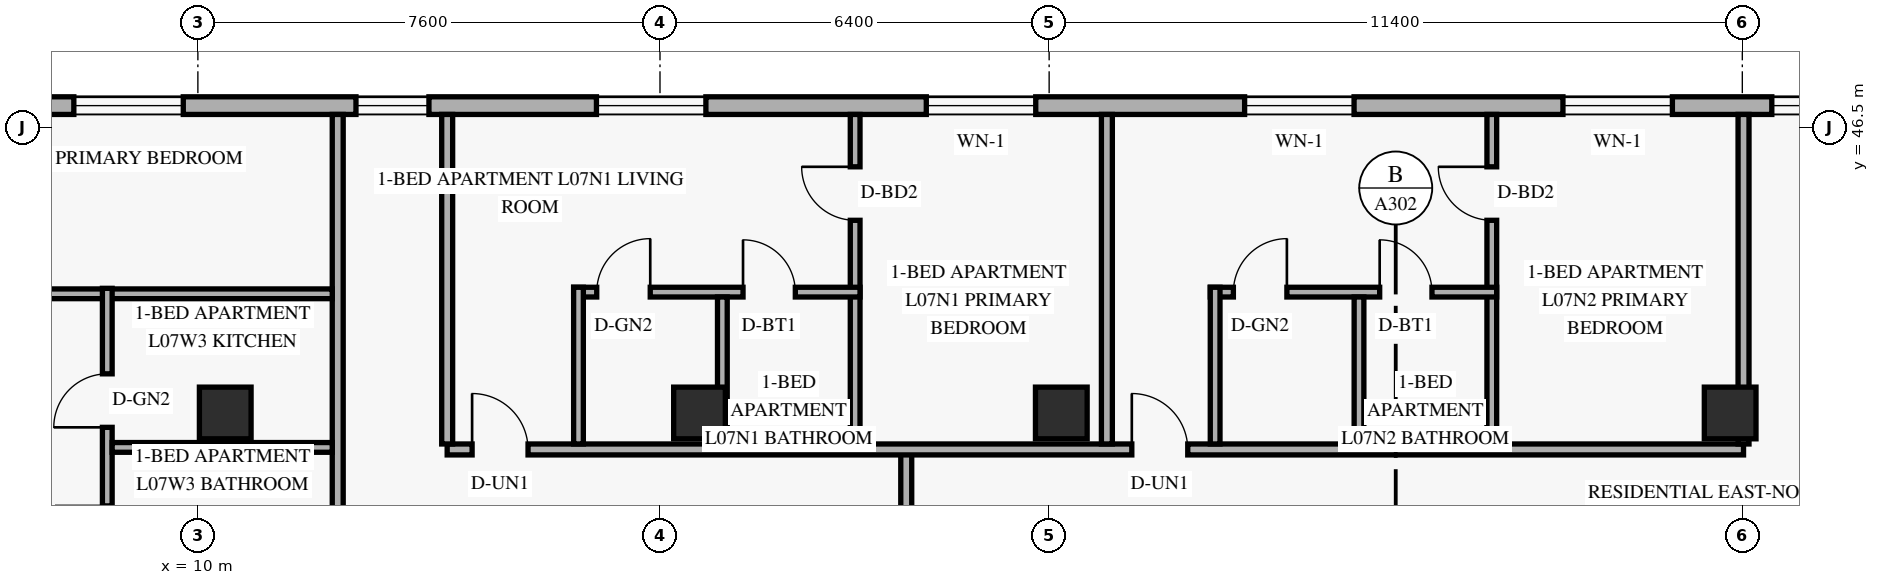
"""IFC4 building model, lengths in metres.
Left out: names, types, materials, properties, quantities, classifications, styles, units other than length and angle.
Written with IfcOpenShell. Run it as: python <this file> out.ifc"""

import sys

from ifc_helpers import new_model, si_unit, direction, frame, frame_2d, origin, origin_2d, place, context, subcontext, project, spatial, rectangle, extrude, element, fill, save


model = new_model("IFC4")
c1 = context("Model", 3, precision=1e-05, world=origin(), true_north=direction((0.0, 1.0)))
c2 = subcontext(c1, "Body", "Model", "MODEL_VIEW")
j1 = project(units=[si_unit("LENGTHUNIT", "METRE"), si_unit("PLANEANGLEUNIT", "RADIAN")], contexts=[c1])
p1 = place(None, origin())
s1 = spatial("IfcSite", under=j1, at=p1, CompositionType="ELEMENT")
p2 = place(p1, origin())
s2 = spatial("IfcBuilding", under=s1, at=p2, CompositionType="ELEMENT")
p3 = place(p2, frame((0.0, 0.0, 31.2)))
s3 = spatial("IfcBuildingStorey", under=s2, at=p3, CompositionType="ELEMENT", Elevation=31.2)
for number, where, z_axis, x_axis in (
    (1, (10.45, 41.8, 0.0), (0.0, 0.0, 1.0), (1.0, 0.0, 0.0)),
    (2, (18.25, 41.8, 0.0), (0.0, 0.0, 1.0), (1.0, 0.0, 0.0)),
    (3, (24.2, 41.8, 0.0), (0.0, 0.0, 1.0), (1.0, 0.0, 0.0)),
    (4, (35.2, 41.8, 0.0), (0.0, 0.0, 1.0), (1.0, 0.0, 0.0)),
):
    element("IfcColumn", number, at=place(p3, frame(where, z_axis=z_axis, x_axis=x_axis)), inside=s3, PredefinedType="COLUMN", context=c2, shape_type="SweptSolid", body=[
        extrude(rectangle(XDim=0.85, YDim=0.85, at=origin_2d()), origin(), (0.0, 0.0, 1.0), 3.6),
    ])
p4 = place(p3, frame((44.98, 46.855, 0.0), z_axis=(0.0, 0.0, 1.0), x_axis=(-1.0, 0.0, 0.0)))
e5 = element("IfcWall", 5, at=p4, inside=s3, PredefinedType="SOLIDWALL", context=c2, shape_type="SweptSolid", body=[
    extrude(rectangle(XDim=39.56, YDim=0.29, at=frame_2d((19.78, 0.0))), origin(), (0.0, 0.0, 1.0), 3.36),
])
p5 = place(p4, frame((35.22, 0.0, 0.85)))
e6 = element("IfcOpeningElement", 6, at=p5, cuts=e5, PredefinedType="OPENING", context=c2, shape_type="SweptSolid", body=[
    extrude(rectangle(XDim=1.8, YDim=1.6, at=frame_2d((0.9, 0.8))), frame((0.0, 0.155, 0.0), z_axis=(0.0, -1.0, 0.0), x_axis=(1.0, 0.0, 0.0)), (0.0, 0.0, 1.0), 0.31),
])
p6 = place(p4, frame((31.18, 0.0, 0.85)))
e7 = element("IfcOpeningElement", 7, at=p6, cuts=e5, PredefinedType="OPENING", context=c2, shape_type="SweptSolid", body=[
    extrude(rectangle(XDim=1.2, YDim=1.5, at=frame_2d((0.6, 0.75))), frame((0.0, 0.155, 0.0), z_axis=(0.0, -1.0, 0.0), x_axis=(1.0, 0.0, 0.0)), (0.0, 0.0, 1.0), 0.31),
])
p7 = place(p4, frame((26.625, 0.0, 0.85)))
e8 = element("IfcOpeningElement", 8, at=p7, cuts=e5, PredefinedType="OPENING", context=c2, shape_type="SweptSolid", body=[
    extrude(rectangle(XDim=1.8, YDim=1.6, at=frame_2d((0.9, 0.8))), frame((0.0, 0.155, 0.0), z_axis=(0.0, -1.0, 0.0), x_axis=(1.0, 0.0, 0.0)), (0.0, 0.0, 1.0), 0.31),
])
p8 = place(p4, frame((21.2, 0.0, 0.85)))
e9 = element("IfcOpeningElement", 9, at=p8, cuts=e5, PredefinedType="OPENING", context=c2, shape_type="SweptSolid", body=[
    extrude(rectangle(XDim=1.8, YDim=1.6, at=frame_2d((0.9, 0.8))), frame((0.0, 0.155, 0.0), z_axis=(0.0, -1.0, 0.0), x_axis=(1.0, 0.0, 0.0)), (0.0, 0.0, 1.0), 0.31),
])
p9 = place(p4, frame((15.965, 0.0, 0.85)))
e10 = element("IfcOpeningElement", 10, at=p9, cuts=e5, PredefinedType="OPENING", context=c2, shape_type="SweptSolid", body=[
    extrude(rectangle(XDim=1.8, YDim=1.6, at=frame_2d((0.9, 0.8))), frame((0.0, 0.155, 0.0), z_axis=(0.0, -1.0, 0.0), x_axis=(1.0, 0.0, 0.0)), (0.0, 0.0, 1.0), 0.31),
])
p10 = place(p4, frame((10.73, 0.0, 0.85)))
e11 = element("IfcOpeningElement", 11, at=p10, cuts=e5, PredefinedType="OPENING", context=c2, shape_type="SweptSolid", body=[
    extrude(rectangle(XDim=1.8, YDim=1.6, at=frame_2d((0.9, 0.8))), frame((0.0, 0.155, 0.0), z_axis=(0.0, -1.0, 0.0), x_axis=(1.0, 0.0, 0.0)), (0.0, 0.0, 1.0), 0.31),
])
p11 = place(p4, frame((7.895, 0.0, 0.85)))
e12 = element("IfcOpeningElement", 12, at=p11, cuts=e5, PredefinedType="OPENING", context=c2, shape_type="SweptSolid", body=[
    extrude(rectangle(XDim=1.2, YDim=1.5, at=frame_2d((0.6, 0.75))), frame((0.0, 0.155, 0.0), z_axis=(0.0, -1.0, 0.0), x_axis=(1.0, 0.0, 0.0)), (0.0, 0.0, 1.0), 0.31),
])
p12 = place(p4, frame((2.815, 0.0, 0.85)))
e13 = element("IfcOpeningElement", 13, at=p12, cuts=e5, PredefinedType="OPENING", context=c2, shape_type="SweptSolid", body=[
    extrude(rectangle(XDim=1.8, YDim=1.6, at=frame_2d((0.9, 0.8))), frame((0.0, 0.155, 0.0), z_axis=(0.0, -1.0, 0.0), x_axis=(1.0, 0.0, 0.0)), (0.0, 0.0, 1.0), 0.31),
])
p13 = place(p3, frame((21.65, 6.8, 0.0), z_axis=(0.0, 0.0, 1.0), x_axis=(0.0, 1.0, 0.0)))
e14 = element("IfcWall", 14, at=p13, inside=s3, PredefinedType="STANDARD", context=c2, shape_type="SweptSolid", body=[
    extrude(rectangle(XDim=34.4, YDim=0.18, at=frame_2d((17.2, 0.0))), origin(), (0.0, 0.0, 1.0), 2.649),
])
p14 = place(p3, frame((14.1, 41.2, 0.0), z_axis=(0.0, 0.0, 1.0), x_axis=(1.0, 0.0, 0.0)))
e15 = element("IfcWall", 15, at=p14, inside=s3, PredefinedType="STANDARD", context=c2, shape_type="SweptSolid", body=[
    extrude(rectangle(XDim=21.32, YDim=0.18, at=frame_2d((10.66, 0.0))), origin(), (0.0, 0.0, 1.0), 2.649),
])
p15 = place(p14, frame((0.41, 0.0, 0.0)))
e16 = element("IfcOpeningElement", 16, at=p15, cuts=e15, PredefinedType="OPENING", context=c2, shape_type="SweptSolid", body=[
    extrude(rectangle(XDim=0.92, YDim=2.15, at=frame_2d((0.46, 1.075))), frame((0.0, 0.1, 0.0), z_axis=(0.0, -1.0, 0.0), x_axis=(1.0, 0.0, 0.0)), (0.0, 0.0, 1.0), 0.2),
])
p16 = place(p14, frame((11.26, 0.0, 0.0)))
e17 = element("IfcOpeningElement", 17, at=p16, cuts=e15, PredefinedType="OPENING", context=c2, shape_type="SweptSolid", body=[
    extrude(rectangle(XDim=0.92, YDim=2.15, at=frame_2d((0.46, 1.075))), frame((0.0, 0.1, 0.0), z_axis=(0.0, -1.0, 0.0), x_axis=(1.0, 0.0, 0.0)), (0.0, 0.0, 1.0), 0.2),
])
p17 = place(p3, frame((35.42, 41.29, 0.0), z_axis=(0.0, 0.0, 1.0), x_axis=(0.0, 1.0, 0.0)))
e18 = element("IfcWall", 18, at=p17, inside=s3, PredefinedType="PARTITIONING", context=c2, shape_type="SweptSolid", body=[
    extrude(rectangle(XDim=5.42, YDim=0.18, at=frame_2d((2.71, 0.0))), origin(), (0.0, 0.0, 1.0), 3.36),
])
p18 = place(p3, frame((12.3, 1.29, 0.0), z_axis=(0.0, 0.0, 1.0), x_axis=(0.0, 1.0, 0.0)))
e19 = element("IfcWall", 19, at=p18, inside=s3, PredefinedType="STANDARD", context=c2, shape_type="SweptSolid", body=[
    extrude(rectangle(XDim=45.42, YDim=0.18, at=frame_2d((22.71, 0.0))), origin(), (0.0, 0.0, 1.0), 2.649),
])
p19 = place(p18, frame((9.41, 0.0, 0.0)))
e20 = element("IfcOpeningElement", 20, at=p19, cuts=e19, PredefinedType="OPENING", context=c2, shape_type="SweptSolid", body=[
    extrude(rectangle(XDim=0.92, YDim=2.15, at=frame_2d((0.46, 1.075))), frame((0.0, 0.1, 0.0), z_axis=(0.0, -1.0, 0.0), x_axis=(1.0, 0.0, 0.0)), (0.0, 0.0, 1.0), 0.2),
])
p20 = place(p18, frame((21.05, 0.0, 0.0)))
e21 = element("IfcOpeningElement", 21, at=p20, cuts=e19, PredefinedType="OPENING", context=c2, shape_type="SweptSolid", body=[
    extrude(rectangle(XDim=0.92, YDim=2.15, at=frame_2d((0.46, 1.075))), frame((0.0, 0.1, 0.0), z_axis=(0.0, -1.0, 0.0), x_axis=(1.0, 0.0, 0.0)), (0.0, 0.0, 1.0), 0.2),
])
p21 = place(p18, frame((36.491, 0.0, 0.0)))
e22 = element("IfcOpeningElement", 22, at=p21, cuts=e19, PredefinedType="OPENING", context=c2, shape_type="SweptSolid", body=[
    extrude(rectangle(XDim=0.92, YDim=2.15, at=frame_2d((0.46, 1.075))), frame((0.0, 0.1, 0.0), z_axis=(0.0, -1.0, 0.0), x_axis=(1.0, 0.0, 0.0)), (0.0, 0.0, 1.0), 0.2),
])
p22 = place(p3, frame((14.1, 41.29, 0.0), z_axis=(0.0, 0.0, 1.0), x_axis=(0.0, 1.0, 0.0)))
e23 = element("IfcWall", 23, at=p22, inside=s3, PredefinedType="PARTITIONING", context=c2, shape_type="SweptSolid", body=[
    extrude(rectangle(XDim=5.42, YDim=0.18, at=frame_2d((2.71, 0.0))), origin(), (0.0, 0.0, 1.0), 2.809),
])
p23 = place(p3, frame((2.162, 43.76, 0.0), z_axis=(0.0, 0.0, 1.0), x_axis=(1.0, 0.0, 0.0)))
e24 = element("IfcWall", 24, at=p23, inside=s3, PredefinedType="PARTITIONING", context=c2, shape_type="SweptSolid", body=[
    extrude(rectangle(XDim=10.048, YDim=0.16, at=frame_2d((5.024, 0.0))), origin(), (0.0, 0.0, 1.0), 3.36),
])
p24 = place(p23, frame((2.528, 0.0, 0.0)))
e25 = element("IfcOpeningElement", 25, at=p24, cuts=e24, PredefinedType="OPENING", context=c2, shape_type="SweptSolid", body=[
    extrude(rectangle(XDim=0.9, YDim=2.14, at=frame_2d((0.45, 1.07))), frame((0.0, 0.09, 0.0), z_axis=(0.0, -1.0, 0.0), x_axis=(1.0, 0.0, 0.0)), (0.0, 0.0, 1.0), 0.18),
])
p25 = place(p3, frame((8.51, 38.991, 0.0), z_axis=(0.0, 0.0, 1.0), x_axis=(0.0, 1.0, 0.0)))
e26 = element("IfcWall", 26, at=p25, inside=s3, PredefinedType="PLUMBINGWALL", context=c2, shape_type="SweptSolid", body=[
    extrude(rectangle(XDim=4.859, YDim=0.16, at=frame_2d((2.429, 0.0))), origin(), (0.0, 0.0, 1.0), 2.809),
])
p26 = place(p25, frame((0.42, 0.0, 0.0)))
e27 = element("IfcOpeningElement", 27, at=p26, cuts=e26, PredefinedType="OPENING", context=c2, shape_type="SweptSolid", body=[
    extrude(rectangle(XDim=0.86, YDim=2.12, at=frame_2d((0.43, 1.06))), frame((0.0, 0.09, 0.0), z_axis=(0.0, -1.0, 0.0), x_axis=(1.0, 0.0, 0.0)), (0.0, 0.0, 1.0), 0.18),
])
p27 = place(p25, frame((2.572, 0.0, 0.0)))
e28 = element("IfcOpeningElement", 28, at=p27, cuts=e26, PredefinedType="OPENING", context=c2, shape_type="SweptSolid", body=[
    extrude(rectangle(XDim=0.88, YDim=2.12, at=frame_2d((0.44, 1.06))), frame((0.0, 0.09, 0.0), z_axis=(0.0, -1.0, 0.0), x_axis=(1.0, 0.0, 0.0)), (0.0, 0.0, 1.0), 0.18),
])
p28 = place(p3, frame((8.59, 41.234, 0.0), z_axis=(0.0, 0.0, 1.0), x_axis=(1.0, 0.0, 0.0)))
e29 = element("IfcWall", 29, at=p28, inside=s3, PredefinedType="PLUMBINGWALL", context=c2, shape_type="SweptSolid", body=[
    extrude(rectangle(XDim=3.62, YDim=0.16, at=frame_2d((1.81, 0.0))), origin(), (0.0, 0.0, 1.0), 2.649),
])
p29 = place(p3, frame((24.95, 41.29, 0.0), z_axis=(0.0, 0.0, 1.0), x_axis=(0.0, 1.0, 0.0)))
e30 = element("IfcWall", 30, at=p29, inside=s3, PredefinedType="PARTITIONING", context=c2, shape_type="SweptSolid", body=[
    extrude(rectangle(XDim=5.42, YDim=0.18, at=frame_2d((2.71, 0.0))), origin(), (0.0, 0.0, 1.0), 2.809),
])
p30 = place(p3, frame((20.81, 41.29, 0.0), z_axis=(0.0, 0.0, 1.0), x_axis=(0.0, 1.0, 0.0)))
e31 = element("IfcWall", 31, at=p30, inside=s3, PredefinedType="PARTITIONING", context=c2, shape_type="SweptSolid", body=[
    extrude(rectangle(XDim=5.42, YDim=0.16, at=frame_2d((2.71, 0.0))), origin(), (0.0, 0.0, 1.0), 2.809),
])
p31 = place(p30, frame((3.679, 0.0, 0.0)))
e32 = element("IfcOpeningElement", 32, at=p31, cuts=e31, PredefinedType="OPENING", context=c2, shape_type="SweptSolid", body=[
    extrude(rectangle(XDim=0.88, YDim=2.14, at=frame_2d((0.44, 1.07))), frame((0.0, 0.09, 0.0), z_axis=(0.0, -1.0, 0.0), x_axis=(1.0, 0.0, 0.0)), (0.0, 0.0, 1.0), 0.18),
])
p32 = place(p3, frame((16.18, 43.788, 0.0), z_axis=(0.0, 0.0, 1.0), x_axis=(1.0, 0.0, 0.0)))
e33 = element("IfcWall", 33, at=p32, inside=s3, PredefinedType="PLUMBINGWALL", context=c2, shape_type="SweptSolid", body=[
    extrude(rectangle(XDim=4.71, YDim=0.16, at=frame_2d((2.355, 0.0))), origin(), (0.0, 0.0, 1.0), 3.36),
])
p33 = place(p32, frame((0.38, 0.0, 0.0)))
e34 = element("IfcOpeningElement", 34, at=p33, cuts=e33, PredefinedType="OPENING", context=c2, shape_type="SweptSolid", body=[
    extrude(rectangle(XDim=0.88, YDim=2.12, at=frame_2d((0.44, 1.06))), frame((0.0, 0.09, 0.0), z_axis=(0.0, -1.0, 0.0), x_axis=(1.0, 0.0, 0.0)), (0.0, 0.0, 1.0), 0.18),
])
p34 = place(p32, frame((2.786, 0.0, 0.0)))
e35 = element("IfcOpeningElement", 35, at=p34, cuts=e33, PredefinedType="OPENING", context=c2, shape_type="SweptSolid", body=[
    extrude(rectangle(XDim=0.86, YDim=2.12, at=frame_2d((0.43, 1.06))), frame((0.0, 0.09, 0.0), z_axis=(0.0, -1.0, 0.0), x_axis=(1.0, 0.0, 0.0)), (0.0, 0.0, 1.0), 0.18),
])
p35 = place(p3, frame((16.26, 41.29, 0.0), z_axis=(0.0, 0.0, 1.0), x_axis=(0.0, 1.0, 0.0)))
e36 = element("IfcWall", 36, at=p35, inside=s3, PredefinedType="PLUMBINGWALL", context=c2, shape_type="SweptSolid", body=[
    extrude(rectangle(XDim=2.577, YDim=0.16, at=frame_2d((1.289, 0.0))), origin(), (0.0, 0.0, 1.0), 2.809),
])
p36 = place(p3, frame((18.625, 41.29, 0.0), z_axis=(0.0, 0.0, 1.0), x_axis=(0.0, 1.0, 0.0)))
e37 = element("IfcWall", 37, at=p36, inside=s3, PredefinedType="PLUMBINGWALL", context=c2, shape_type="SweptSolid", body=[
    extrude(rectangle(XDim=2.417, YDim=0.16, at=frame_2d((1.209, 0.0))), origin(), (0.0, 0.0, 1.0), 2.809),
])
p37 = place(p3, frame((31.28, 41.29, 0.0), z_axis=(0.0, 0.0, 1.0), x_axis=(0.0, 1.0, 0.0)))
e38 = element("IfcWall", 38, at=p37, inside=s3, PredefinedType="PARTITIONING", context=c2, shape_type="SweptSolid", body=[
    extrude(rectangle(XDim=5.42, YDim=0.16, at=frame_2d((2.71, 0.0))), origin(), (0.0, 0.0, 1.0), 2.809),
])
p38 = place(p37, frame((3.679, 0.0, 0.0)))
e39 = element("IfcOpeningElement", 39, at=p38, cuts=e38, PredefinedType="OPENING", context=c2, shape_type="SweptSolid", body=[
    extrude(rectangle(XDim=0.88, YDim=2.14, at=frame_2d((0.44, 1.07))), frame((0.0, 0.09, 0.0), z_axis=(0.0, -1.0, 0.0), x_axis=(1.0, 0.0, 0.0)), (0.0, 0.0, 1.0), 0.18),
])
p39 = place(p3, frame((26.65, 43.788, 0.0), z_axis=(0.0, 0.0, 1.0), x_axis=(1.0, 0.0, 0.0)))
e40 = element("IfcWall", 40, at=p39, inside=s3, PredefinedType="PLUMBINGWALL", context=c2, shape_type="SweptSolid", body=[
    extrude(rectangle(XDim=4.71, YDim=0.16, at=frame_2d((2.355, 0.0))), origin(), (0.0, 0.0, 1.0), 3.36),
])
p40 = place(p39, frame((0.38, 0.0, 0.0)))
e41 = element("IfcOpeningElement", 41, at=p40, cuts=e40, PredefinedType="OPENING", context=c2, shape_type="SweptSolid", body=[
    extrude(rectangle(XDim=0.88, YDim=2.12, at=frame_2d((0.44, 1.06))), frame((0.0, 0.09, 0.0), z_axis=(0.0, -1.0, 0.0), x_axis=(1.0, 0.0, 0.0)), (0.0, 0.0, 1.0), 0.18),
])
p41 = place(p39, frame((2.786, 0.0, 0.0)))
e42 = element("IfcOpeningElement", 42, at=p41, cuts=e40, PredefinedType="OPENING", context=c2, shape_type="SweptSolid", body=[
    extrude(rectangle(XDim=0.86, YDim=2.12, at=frame_2d((0.43, 1.06))), frame((0.0, 0.09, 0.0), z_axis=(0.0, -1.0, 0.0), x_axis=(1.0, 0.0, 0.0)), (0.0, 0.0, 1.0), 0.18),
])
p42 = place(p3, frame((26.73, 41.29, 0.0), z_axis=(0.0, 0.0, 1.0), x_axis=(0.0, 1.0, 0.0)))
e43 = element("IfcWall", 43, at=p42, inside=s3, PredefinedType="PLUMBINGWALL", context=c2, shape_type="SweptSolid", body=[
    extrude(rectangle(XDim=2.577, YDim=0.16, at=frame_2d((1.289, 0.0))), origin(), (0.0, 0.0, 1.0), 2.809),
])
p43 = place(p3, frame((29.096, 41.29, 0.0), z_axis=(0.0, 0.0, 1.0), x_axis=(0.0, 1.0, 0.0)))
e44 = element("IfcWall", 44, at=p43, inside=s3, PredefinedType="PLUMBINGWALL", context=c2, shape_type="SweptSolid", body=[
    extrude(rectangle(XDim=2.417, YDim=0.16, at=frame_2d((1.209, 0.0))), origin(), (0.0, 0.0, 1.0), 2.809),
])
p44 = place(p5, origin())
e45 = element("IfcWindow", 45, at=p44, inside=s3, PartitioningType="SINGLE_PANEL", PredefinedType="WINDOW", context=c2, shape_type="SweptSolid", body=[
    extrude(rectangle(XDim=1.8, YDim=1.6, at=frame_2d((0.9, 0.8))), frame((0.0, 0.03, 0.0), z_axis=(0.0, -1.0, 0.0), x_axis=(1.0, 0.0, 0.0)), (0.0, 0.0, 1.0), 0.06),
])
fill(e6, e45)
p45 = place(p6, origin())
e46 = element("IfcWindow", 46, at=p45, inside=s3, PartitioningType="SINGLE_PANEL", PredefinedType="WINDOW", context=c2, shape_type="SweptSolid", body=[
    extrude(rectangle(XDim=1.2, YDim=1.5, at=frame_2d((0.6, 0.75))), frame((0.0, 0.03, 0.0), z_axis=(0.0, -1.0, 0.0), x_axis=(1.0, 0.0, 0.0)), (0.0, 0.0, 1.0), 0.06),
])
fill(e7, e46)
p46 = place(p7, origin())
e47 = element("IfcWindow", 47, at=p46, inside=s3, PartitioningType="SINGLE_PANEL", PredefinedType="WINDOW", context=c2, shape_type="SweptSolid", body=[
    extrude(rectangle(XDim=1.8, YDim=1.6, at=frame_2d((0.9, 0.8))), frame((0.0, 0.03, 0.0), z_axis=(0.0, -1.0, 0.0), x_axis=(1.0, 0.0, 0.0)), (0.0, 0.0, 1.0), 0.06),
])
fill(e8, e47)
p47 = place(p8, origin())
e48 = element("IfcWindow", 48, at=p47, inside=s3, PartitioningType="SINGLE_PANEL", PredefinedType="WINDOW", context=c2, shape_type="SweptSolid", body=[
    extrude(rectangle(XDim=1.8, YDim=1.6, at=frame_2d((0.9, 0.8))), frame((0.0, 0.03, 0.0), z_axis=(0.0, -1.0, 0.0), x_axis=(1.0, 0.0, 0.0)), (0.0, 0.0, 1.0), 0.06),
])
fill(e9, e48)
p48 = place(p9, origin())
e49 = element("IfcWindow", 49, at=p48, inside=s3, PartitioningType="SINGLE_PANEL", PredefinedType="WINDOW", context=c2, shape_type="SweptSolid", body=[
    extrude(rectangle(XDim=1.8, YDim=1.6, at=frame_2d((0.9, 0.8))), frame((0.0, 0.03, 0.0), z_axis=(0.0, -1.0, 0.0), x_axis=(1.0, 0.0, 0.0)), (0.0, 0.0, 1.0), 0.06),
])
fill(e10, e49)
p49 = place(p10, origin())
e50 = element("IfcWindow", 50, at=p49, inside=s3, PartitioningType="SINGLE_PANEL", PredefinedType="WINDOW", context=c2, shape_type="SweptSolid", body=[
    extrude(rectangle(XDim=1.8, YDim=1.6, at=frame_2d((0.9, 0.8))), frame((0.0, 0.03, 0.0), z_axis=(0.0, -1.0, 0.0), x_axis=(1.0, 0.0, 0.0)), (0.0, 0.0, 1.0), 0.06),
])
fill(e11, e50)
p50 = place(p11, origin())
e51 = element("IfcWindow", 51, at=p50, inside=s3, PartitioningType="SINGLE_PANEL", PredefinedType="WINDOW", context=c2, shape_type="SweptSolid", body=[
    extrude(rectangle(XDim=1.2, YDim=1.5, at=frame_2d((0.6, 0.75))), frame((0.0, 0.03, 0.0), z_axis=(0.0, -1.0, 0.0), x_axis=(1.0, 0.0, 0.0)), (0.0, 0.0, 1.0), 0.06),
])
fill(e12, e51)
p51 = place(p27, origin())
e52 = element("IfcDoor", 52, at=p51, inside=s3, OperationType="SINGLE_SWING_LEFT", PredefinedType="DOOR", context=c2, shape_type="SweptSolid", body=[
    extrude(rectangle(XDim=0.88, YDim=2.12, at=frame_2d((0.44, 1.06))), frame((0.0, 0.025, 0.0), z_axis=(0.0, -1.0, 0.0), x_axis=(1.0, 0.0, 0.0)), (0.0, 0.0, 1.0), 0.05),
])
fill(e28, e52)
p52 = place(p15, origin())
e53 = element("IfcDoor", 53, at=p52, inside=s3, OperationType="SINGLE_SWING_LEFT", PredefinedType="DOOR", context=c2, shape_type="SweptSolid", body=[
    extrude(rectangle(XDim=0.92, YDim=2.15, at=frame_2d((0.46, 1.075))), frame((0.0, 0.025, 0.0), z_axis=(0.0, -1.0, 0.0), x_axis=(1.0, 0.0, 0.0)), (0.0, 0.0, 1.0), 0.05),
])
fill(e16, e53)
p53 = place(p33, origin())
e54 = element("IfcDoor", 54, at=p53, inside=s3, OperationType="SINGLE_SWING_RIGHT", PredefinedType="DOOR", context=c2, shape_type="SweptSolid", body=[
    extrude(rectangle(XDim=0.88, YDim=2.12, at=frame_2d((0.44, 1.06))), frame((0.0, 0.025, 0.0), z_axis=(0.0, -1.0, 0.0), x_axis=(1.0, 0.0, 0.0)), (0.0, 0.0, 1.0), 0.05),
])
fill(e34, e54)
p54 = place(p34, origin())
e55 = element("IfcDoor", 55, at=p54, inside=s3, OperationType="SINGLE_SWING_LEFT", PredefinedType="DOOR", context=c2, shape_type="SweptSolid", body=[
    extrude(rectangle(XDim=0.86, YDim=2.12, at=frame_2d((0.43, 1.06))), frame((0.0, 0.025, 0.0), z_axis=(0.0, -1.0, 0.0), x_axis=(1.0, 0.0, 0.0)), (0.0, 0.0, 1.0), 0.05),
])
fill(e35, e55)
p55 = place(p31, origin())
e56 = element("IfcDoor", 56, at=p55, inside=s3, OperationType="SINGLE_SWING_RIGHT", PredefinedType="DOOR", context=c2, shape_type="SweptSolid", body=[
    extrude(rectangle(XDim=0.88, YDim=2.14, at=frame_2d((0.44, 1.07))), frame((0.0, 0.025, 0.0), z_axis=(0.0, -1.0, 0.0), x_axis=(1.0, 0.0, 0.0)), (0.0, 0.0, 1.0), 0.05),
])
fill(e32, e56)
p56 = place(p16, origin())
e57 = element("IfcDoor", 57, at=p56, inside=s3, OperationType="SINGLE_SWING_LEFT", PredefinedType="DOOR", context=c2, shape_type="SweptSolid", body=[
    extrude(rectangle(XDim=0.92, YDim=2.15, at=frame_2d((0.46, 1.075))), frame((0.0, 0.025, 0.0), z_axis=(0.0, -1.0, 0.0), x_axis=(1.0, 0.0, 0.0)), (0.0, 0.0, 1.0), 0.05),
])
fill(e17, e57)
p57 = place(p40, origin())
e58 = element("IfcDoor", 58, at=p57, inside=s3, OperationType="SINGLE_SWING_RIGHT", PredefinedType="DOOR", context=c2, shape_type="SweptSolid", body=[
    extrude(rectangle(XDim=0.88, YDim=2.12, at=frame_2d((0.44, 1.06))), frame((0.0, 0.025, 0.0), z_axis=(0.0, -1.0, 0.0), x_axis=(1.0, 0.0, 0.0)), (0.0, 0.0, 1.0), 0.05),
])
fill(e41, e58)
p58 = place(p41, origin())
e59 = element("IfcDoor", 59, at=p58, inside=s3, OperationType="SINGLE_SWING_LEFT", PredefinedType="DOOR", context=c2, shape_type="SweptSolid", body=[
    extrude(rectangle(XDim=0.86, YDim=2.12, at=frame_2d((0.43, 1.06))), frame((0.0, 0.025, 0.0), z_axis=(0.0, -1.0, 0.0), x_axis=(1.0, 0.0, 0.0)), (0.0, 0.0, 1.0), 0.05),
])
fill(e42, e59)
p59 = place(p38, origin())
e60 = element("IfcDoor", 60, at=p59, inside=s3, OperationType="SINGLE_SWING_RIGHT", PredefinedType="DOOR", context=c2, shape_type="SweptSolid", body=[
    extrude(rectangle(XDim=0.88, YDim=2.14, at=frame_2d((0.44, 1.07))), frame((0.0, 0.025, 0.0), z_axis=(0.0, -1.0, 0.0), x_axis=(1.0, 0.0, 0.0)), (0.0, 0.0, 1.0), 0.05),
])
fill(e39, e60)
save(model, sys.argv[1])
